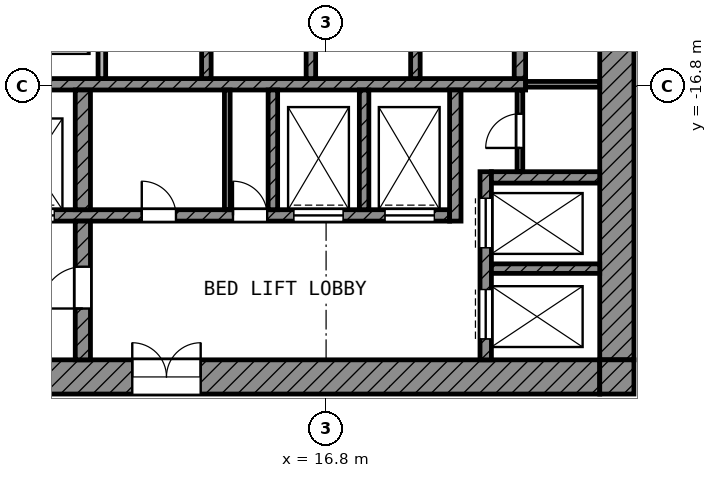
"""IFC4 building model, lengths in metres.
Left out: names, types, materials, properties, quantities, classifications, styles, units other than length and angle.
Written with IfcOpenShell. Run it as: python <this file> out.ifc"""

import sys

from ifc_helpers import new_model, si_unit, direction, frame, frame_2d, origin, place, context, subcontext, project, spatial, rectangle, extrude, element, fill, save


model = new_model("IFC4")
c1 = context("Model", 3, precision=1e-05, world=origin(), true_north=direction((0.0, 1.0)))
c2 = subcontext(c1, "Body", "Model", "MODEL_VIEW")
j1 = project(units=[si_unit("LENGTHUNIT", "METRE"), si_unit("PLANEANGLEUNIT", "RADIAN")], contexts=[c1])
p1 = place(None, origin())
s1 = spatial("IfcSite", under=j1, at=p1, CompositionType="ELEMENT")
p2 = place(p1, origin())
s2 = spatial("IfcBuilding", under=s1, at=p2, CompositionType="ELEMENT")
p3 = place(p2, frame((0.0, 0.0, 158.4)))
s3 = spatial("IfcBuildingStorey", under=s2, at=p3, CompositionType="ELEMENT", Elevation=158.4)
p4 = place(p3, frame((24.45, -24.0, 0.0), z_axis=(0.0, 0.0, 1.0), x_axis=(0.0, 1.0, 0.0)))
e1 = element("IfcWall", 1, at=p4, inside=s3, PredefinedType="SHEAR", context=c2, shape_type="SweptSolid", body=[
    extrude(rectangle(XDim=18.6, YDim=0.9, at=frame_2d((9.3, 0.0))), origin(), (0.0, 0.0, 1.0), 3.6),
])
p5 = place(p4, frame((10.5, 0.0, 0.0)))
e2 = element("IfcOpeningElement", 2, at=p5, cuts=e1, PredefinedType="OPENING", context=c2, shape_type="SweptSolid", body=[
    extrude(rectangle(XDim=1.8, YDim=2.1, at=frame_2d((0.9, 1.05))), frame((0.0, 0.46, 0.0), z_axis=(0.0, -1.0, 0.0), x_axis=(1.0, 0.0, 0.0)), (0.0, 0.0, 1.0), 0.92),
])
p6 = place(p3, frame((5.4, -24.45, 0.0), z_axis=(0.0, 0.0, 1.0), x_axis=(1.0, 0.0, 0.0)))
e3 = element("IfcWall", 3, at=p6, inside=s3, PredefinedType="SHEAR", context=c2, shape_type="SweptSolid", body=[
    extrude(rectangle(XDim=18.6, YDim=0.9, at=frame_2d((9.3, 0.0))), origin(), (0.0, 0.0, 1.0), 3.6),
])
p7 = place(p6, frame((6.3, 0.0, 0.0)))
e4 = element("IfcOpeningElement", 4, at=p7, cuts=e3, PredefinedType="OPENING", context=c2, shape_type="SweptSolid", body=[
    extrude(rectangle(XDim=1.8, YDim=2.1, at=frame_2d((0.9, 1.05))), frame((0.0, 0.46, 0.0), z_axis=(0.0, -1.0, 0.0), x_axis=(1.0, 0.0, 0.0)), (0.0, 0.0, 1.0), 0.92),
])
p8 = place(p3, frame((24.45, -24.9, 0.0), z_axis=(0.0, 0.0, 1.0), x_axis=(0.0, 1.0, 0.0)))
e5 = element("IfcWall", 5, at=p8, inside=s3, PredefinedType="SHEAR", context=c2, shape_type="SweptSolid", body=[
    extrude(rectangle(XDim=0.9, YDim=0.9, at=frame_2d((0.45, 0.0))), origin(), (0.0, 0.0, 1.0), 3.6),
])
p9 = place(p3, frame((5.4, -16.75, 0.0), z_axis=(0.0, 0.0, 1.0), x_axis=(1.0, 0.0, 0.0)))
e6 = element("IfcWall", 6, at=p9, inside=s3, PredefinedType="SHEAR", context=c2, shape_type="SweptSolid", body=[
    extrude(rectangle(XDim=16.65, YDim=0.3, at=frame_2d((8.325, 0.0))), origin(), (0.0, 0.0, 1.0), 3.6),
])
p10 = place(p3, frame((5.4, -20.2, 0.0), z_axis=(0.0, 0.0, 1.0), x_axis=(1.0, 0.0, 0.0)))
e7 = element("IfcWall", 7, at=p10, inside=s3, PredefinedType="SHEAR", context=c2, shape_type="SweptSolid", body=[
    extrude(rectangle(XDim=14.65, YDim=0.3, at=frame_2d((7.325, 0.0))), origin(), (0.0, 0.0, 1.0), 3.6),
])
p11 = place(p10, frame((10.55, 0.0, 0.0)))
e8 = element("IfcOpeningElement", 8, at=p11, cuts=e7, PredefinedType="OPENING", context=c2, shape_type="SweptSolid", body=[
    extrude(rectangle(XDim=1.3, YDim=2.1, at=frame_2d((0.65, 1.05))), frame((0.0, 0.16, 0.0), z_axis=(0.0, -1.0, 0.0), x_axis=(1.0, 0.0, 0.0)), (0.0, 0.0, 1.0), 0.32),
])
p12 = place(p10, frame((12.95, 0.0, 0.0)))
e9 = element("IfcOpeningElement", 9, at=p12, cuts=e7, PredefinedType="OPENING", context=c2, shape_type="SweptSolid", body=[
    extrude(rectangle(XDim=1.3, YDim=2.1, at=frame_2d((0.65, 1.05))), frame((0.0, 0.16, 0.0), z_axis=(0.0, -1.0, 0.0), x_axis=(1.0, 0.0, 0.0)), (0.0, 0.0, 1.0), 0.32),
])
p13 = place(p10, frame((0.55, 0.0, 0.0)))
e10 = element("IfcOpeningElement", 10, at=p13, cuts=e7, PredefinedType="OPENING", context=c2, shape_type="SweptSolid", body=[
    extrude(rectangle(XDim=1.3, YDim=2.1, at=frame_2d((0.65, 1.05))), frame((0.0, 0.16, 0.0), z_axis=(0.0, -1.0, 0.0), x_axis=(1.0, 0.0, 0.0)), (0.0, 0.0, 1.0), 0.32),
])
p14 = place(p10, frame((2.95, 0.0, 0.0)))
e11 = element("IfcOpeningElement", 11, at=p14, cuts=e7, PredefinedType="OPENING", context=c2, shape_type="SweptSolid", body=[
    extrude(rectangle(XDim=1.3, YDim=2.1, at=frame_2d((0.65, 1.05))), frame((0.0, 0.16, 0.0), z_axis=(0.0, -1.0, 0.0), x_axis=(1.0, 0.0, 0.0)), (0.0, 0.0, 1.0), 0.32),
])
p15 = place(p10, frame((6.55, 0.0, 0.0)))
e12 = element("IfcOpeningElement", 12, at=p15, cuts=e7, PredefinedType="OPENING", context=c2, shape_type="SweptSolid", body=[
    extrude(rectangle(XDim=0.9, YDim=2.1, at=frame_2d((0.45, 1.05))), frame((0.0, 0.16, 0.0), z_axis=(0.0, -1.0, 0.0), x_axis=(1.0, 0.0, 0.0)), (0.0, 0.0, 1.0), 0.32),
])
p16 = place(p10, frame((8.95, 0.0, 0.0)))
e13 = element("IfcOpeningElement", 13, at=p16, cuts=e7, PredefinedType="OPENING", context=c2, shape_type="SweptSolid", body=[
    extrude(rectangle(XDim=0.9, YDim=2.1, at=frame_2d((0.45, 1.05))), frame((0.0, 0.16, 0.0), z_axis=(0.0, -1.0, 0.0), x_axis=(1.0, 0.0, 0.0)), (0.0, 0.0, 1.0), 0.32),
])
p17 = place(p3, frame((10.4, -24.0, 0.0), z_axis=(0.0, 0.0, 1.0), x_axis=(0.0, 1.0, 0.0)))
e14 = element("IfcWall", 14, at=p17, inside=s3, PredefinedType="SHEAR", context=c2, shape_type="SweptSolid", body=[
    extrude(rectangle(XDim=3.65, YDim=0.4, at=frame_2d((1.825, 0.0))), origin(), (0.0, 0.0, 1.0), 3.6),
])
p18 = place(p17, frame((1.35, 0.0, 0.0)))
e15 = element("IfcOpeningElement", 15, at=p18, cuts=e14, PredefinedType="OPENING", context=c2, shape_type="SweptSolid", body=[
    extrude(rectangle(XDim=1.1, YDim=2.1, at=frame_2d((0.55, 1.05))), frame((0.0, 0.21, 0.0), z_axis=(0.0, -1.0, 0.0), x_axis=(1.0, 0.0, 0.0)), (0.0, 0.0, 1.0), 0.42),
])
p19 = place(p3, frame((10.4, -20.05, 0.0), z_axis=(0.0, 0.0, 1.0), x_axis=(0.0, 1.0, 0.0)))
e16 = element("IfcWall", 16, at=p19, inside=s3, PredefinedType="SHEAR", context=c2, shape_type="SweptSolid", body=[
    extrude(rectangle(XDim=3.15, YDim=0.4, at=frame_2d((1.575, 0.0))), origin(), (0.0, 0.0, 1.0), 3.6),
])
p20 = place(p3, frame((20.2, -20.35, 0.0), z_axis=(0.0, 0.0, 1.0), x_axis=(0.0, 1.0, 0.0)))
e17 = element("IfcWall", 17, at=p20, inside=s3, PredefinedType="SHEAR", context=c2, shape_type="SweptSolid", body=[
    extrude(rectangle(XDim=3.45, YDim=0.3, at=frame_2d((1.725, 0.0))), origin(), (0.0, 0.0, 1.0), 3.6),
])
p21 = place(p3, frame((21.9, -16.6, 0.0), z_axis=(0.0, 0.0, 1.0), x_axis=(0.0, 1.0, 0.0)))
e18 = element("IfcWall", 18, at=p21, inside=s3, PredefinedType="SHEAR", context=c2, shape_type="SweptSolid", body=[
    extrude(rectangle(XDim=2.35, YDim=0.3, at=frame_2d((1.175, 0.0))), origin(), (0.0, 0.0, 1.0), 3.6),
])
p22 = place(p3, frame((21.15, -19.2, 0.0), z_axis=(0.0, 0.0, 1.0), x_axis=(1.0, 0.0, 0.0)))
e19 = element("IfcWall", 19, at=p22, inside=s3, PredefinedType="SHEAR", context=c2, shape_type="SweptSolid", body=[
    extrude(rectangle(XDim=2.85, YDim=0.3, at=frame_2d((1.425, 0.0))), origin(), (0.0, 0.0, 1.0), 3.6),
])
p23 = place(p3, frame((21.0, -24.0, 0.0), z_axis=(0.0, 0.0, 1.0), x_axis=(0.0, 1.0, 0.0)))
e20 = element("IfcWall", 20, at=p23, inside=s3, PredefinedType="SHEAR", context=c2, shape_type="SweptSolid", body=[
    extrude(rectangle(XDim=4.95, YDim=0.3, at=frame_2d((2.475, 0.0))), origin(), (0.0, 0.0, 1.0), 3.6),
])
p24 = place(p23, frame((2.95, 0.0, 0.0)))
e21 = element("IfcOpeningElement", 21, at=p24, cuts=e20, PredefinedType="OPENING", context=c2, shape_type="SweptSolid", body=[
    extrude(rectangle(XDim=1.3, YDim=2.1, at=frame_2d((0.65, 1.05))), frame((0.0, 0.16, 0.0), z_axis=(0.0, -1.0, 0.0), x_axis=(1.0, 0.0, 0.0)), (0.0, 0.0, 1.0), 0.32),
])
p25 = place(p23, frame((0.55, 0.0, 0.0)))
e22 = element("IfcOpeningElement", 22, at=p25, cuts=e20, PredefinedType="OPENING", context=c2, shape_type="SweptSolid", body=[
    extrude(rectangle(XDim=1.3, YDim=2.1, at=frame_2d((0.65, 1.05))), frame((0.0, 0.16, 0.0), z_axis=(0.0, -1.0, 0.0), x_axis=(1.0, 0.0, 0.0)), (0.0, 0.0, 1.0), 0.32),
])
p26 = place(p3, frame((21.15, -21.6, 0.0), z_axis=(0.0, 0.0, 1.0), x_axis=(1.0, 0.0, 0.0)))
e23 = element("IfcWall", 23, at=p26, inside=s3, PredefinedType="SHEAR", context=c2, shape_type="SweptSolid", body=[
    extrude(rectangle(XDim=2.85, YDim=0.25, at=frame_2d((1.425, 0.0))), origin(), (0.0, 0.0, 1.0), 3.6),
])
for number, where, z_axis, x_axis in (
    (24, (15.4, -20.05, 0.0), (0.0, 0.0, 1.0), (0.0, 1.0, 0.0)),
    (25, (17.8, -20.05, 0.0), (0.0, 0.0, 1.0), (0.0, 1.0, 0.0)),
):
    element("IfcWall", number, at=place(p3, frame(where, z_axis=z_axis, x_axis=x_axis)), inside=s3, PredefinedType="SHEAR", context=c2, shape_type="SweptSolid", body=[
        extrude(rectangle(XDim=3.15, YDim=0.25, at=frame_2d((1.575, 0.0))), origin(), (0.0, 0.0, 1.0), 3.6),
    ])
p27 = place(p3, frame((10.9, -16.6, 0.0), z_axis=(0.0, 0.0, 1.0), x_axis=(0.0, 1.0, 0.0)))
e26 = element("IfcWall", 26, at=p27, inside=s3, PredefinedType="PARTITIONING", context=c2, shape_type="SweptSolid", body=[
    extrude(rectangle(XDim=2.35, YDim=0.2, at=frame_2d((1.175, 0.0))), origin(), (0.0, 0.0, 1.0), 3.6),
])
for number, where, z_axis, x_axis in (
    (27, (13.65, -16.6, 0.0), (0.0, 0.0, 1.0), (0.0, 1.0, 0.0)),
    (28, (16.4, -16.6, 0.0), (0.0, 0.0, 1.0), (0.0, 1.0, 0.0)),
    (29, (19.15, -16.6, 0.0), (0.0, 0.0, 1.0), (0.0, 1.0, 0.0)),
):
    element("IfcWall", number, at=place(p3, frame(where, z_axis=z_axis, x_axis=x_axis)), inside=s3, PredefinedType="SHEAR", context=c2, shape_type="SweptSolid", body=[
        extrude(rectangle(XDim=2.35, YDim=0.25, at=frame_2d((1.175, 0.0))), origin(), (0.0, 0.0, 1.0), 3.6),
    ])
p28 = place(p3, frame((21.9, -19.05, 0.0), z_axis=(0.0, 0.0, 1.0), x_axis=(0.0, 1.0, 0.0)))
e30 = element("IfcWall", 30, at=p28, inside=s3, PredefinedType="PARTITIONING", context=c2, shape_type="SweptSolid", body=[
    extrude(rectangle(XDim=2.15, YDim=0.15, at=frame_2d((1.075, 0.0))), origin(), (0.0, 0.0, 1.0), 3.6),
])
p29 = place(p28, frame((0.625, 0.0, 0.0)))
e31 = element("IfcOpeningElement", 31, at=p29, cuts=e30, PredefinedType="OPENING", context=c2, shape_type="SweptSolid", body=[
    extrude(rectangle(XDim=0.9, YDim=2.1, at=frame_2d((0.45, 1.05))), frame((0.0, 0.085, 0.0), z_axis=(0.0, -1.0, 0.0), x_axis=(1.0, 0.0, 0.0)), (0.0, 0.0, 1.0), 0.17),
])
p30 = place(p3, frame((22.05, -16.75, 0.0), z_axis=(0.0, 0.0, 1.0), x_axis=(1.0, 0.0, 0.0)))
e32 = element("IfcWall", 32, at=p30, inside=s3, PredefinedType="PARTITIONING", context=c2, shape_type="SweptSolid", body=[
    extrude(rectangle(XDim=1.95, YDim=0.15, at=frame_2d((0.975, 0.0))), origin(), (0.0, 0.0, 1.0), 3.6),
])
p31 = place(p3, frame((14.2, -20.05, 0.0), z_axis=(0.0, 0.0, 1.0), x_axis=(0.0, 1.0, 0.0)))
e33 = element("IfcWall", 33, at=p31, inside=s3, PredefinedType="PARTITIONING", context=c2, shape_type="SweptSolid", body=[
    extrude(rectangle(XDim=3.15, YDim=0.15, at=frame_2d((1.575, 0.0))), origin(), (0.0, 0.0, 1.0), 3.6),
])
p32 = place(p24, origin())
e34 = element("IfcDoor", 34, at=p32, inside=s3, OperationType="DOUBLE_DOOR_SLIDING", PredefinedType="DOOR", context=c2, shape_type="SweptSolid", body=[
    extrude(rectangle(XDim=1.3, YDim=2.1, at=frame_2d((0.65, 1.05))), frame((0.0, 0.025, 0.0), z_axis=(0.0, -1.0, 0.0), x_axis=(1.0, 0.0, 0.0)), (0.0, 0.0, 1.0), 0.05),
])
fill(e21, e34)
p33 = place(p25, origin())
e35 = element("IfcDoor", 35, at=p33, inside=s3, OperationType="DOUBLE_DOOR_SLIDING", PredefinedType="DOOR", context=c2, shape_type="SweptSolid", body=[
    extrude(rectangle(XDim=1.3, YDim=2.1, at=frame_2d((0.65, 1.05))), frame((0.0, 0.025, 0.0), z_axis=(0.0, -1.0, 0.0), x_axis=(1.0, 0.0, 0.0)), (0.0, 0.0, 1.0), 0.05),
])
fill(e22, e35)
p34 = place(p11, origin())
e36 = element("IfcDoor", 36, at=p34, inside=s3, OperationType="DOUBLE_DOOR_SLIDING", PredefinedType="DOOR", context=c2, shape_type="SweptSolid", body=[
    extrude(rectangle(XDim=1.3, YDim=2.1, at=frame_2d((0.65, 1.05))), frame((0.0, 0.025, 0.0), z_axis=(0.0, -1.0, 0.0), x_axis=(1.0, 0.0, 0.0)), (0.0, 0.0, 1.0), 0.05),
])
fill(e8, e36)
p35 = place(p12, origin())
e37 = element("IfcDoor", 37, at=p35, inside=s3, OperationType="DOUBLE_DOOR_SLIDING", PredefinedType="DOOR", context=c2, shape_type="SweptSolid", body=[
    extrude(rectangle(XDim=1.3, YDim=2.1, at=frame_2d((0.65, 1.05))), frame((0.0, 0.025, 0.0), z_axis=(0.0, -1.0, 0.0), x_axis=(1.0, 0.0, 0.0)), (0.0, 0.0, 1.0), 0.05),
])
fill(e9, e37)
p36 = place(p14, origin())
e38 = element("IfcDoor", 38, at=p36, inside=s3, OperationType="DOUBLE_DOOR_SLIDING", PredefinedType="DOOR", context=c2, shape_type="SweptSolid", body=[
    extrude(rectangle(XDim=1.3, YDim=2.1, at=frame_2d((0.65, 1.05))), frame((0.0, 0.025, 0.0), z_axis=(0.0, -1.0, 0.0), x_axis=(1.0, 0.0, 0.0)), (0.0, 0.0, 1.0), 0.05),
])
fill(e11, e38)
p37 = place(p18, origin())
e39 = element("IfcDoor", 39, at=p37, inside=s3, OperationType="SINGLE_SWING_LEFT", PredefinedType="DOOR", context=c2, shape_type="SweptSolid", body=[
    extrude(rectangle(XDim=1.1, YDim=2.1, at=frame_2d((0.55, 1.05))), frame((0.0, 0.025, 0.0), z_axis=(0.0, -1.0, 0.0), x_axis=(1.0, 0.0, 0.0)), (0.0, 0.0, 1.0), 0.05),
])
fill(e15, e39)
p38 = place(p7, origin())
e40 = element("IfcDoor", 40, at=p38, inside=s3, OperationType="DOUBLE_DOOR_SINGLE_SWING", PredefinedType="DOOR", context=c2, shape_type="SweptSolid", body=[
    extrude(rectangle(XDim=1.8, YDim=2.1, at=frame_2d((0.9, 1.05))), frame((0.0, 0.025, 0.0), z_axis=(0.0, -1.0, 0.0), x_axis=(1.0, 0.0, 0.0)), (0.0, 0.0, 1.0), 0.05),
])
fill(e4, e40)
p39 = place(p29, origin())
e41 = element("IfcDoor", 41, at=p39, inside=s3, OperationType="SINGLE_SWING_LEFT", PredefinedType="DOOR", context=c2, shape_type="SweptSolid", body=[
    extrude(rectangle(XDim=0.9, YDim=2.1, at=frame_2d((0.45, 1.05))), frame((0.0, 0.025, 0.0), z_axis=(0.0, -1.0, 0.0), x_axis=(1.0, 0.0, 0.0)), (0.0, 0.0, 1.0), 0.05),
])
fill(e31, e41)
p40 = place(p15, origin())
e42 = element("IfcDoor", 42, at=p40, inside=s3, OperationType="SINGLE_SWING_LEFT", PredefinedType="DOOR", context=c2, shape_type="SweptSolid", body=[
    extrude(rectangle(XDim=0.9, YDim=2.1, at=frame_2d((0.45, 1.05))), frame((0.0, 0.025, 0.0), z_axis=(0.0, -1.0, 0.0), x_axis=(1.0, 0.0, 0.0)), (0.0, 0.0, 1.0), 0.05),
])
fill(e12, e42)
p41 = place(p16, origin())
e43 = element("IfcDoor", 43, at=p41, inside=s3, OperationType="SINGLE_SWING_LEFT", PredefinedType="DOOR", context=c2, shape_type="SweptSolid", body=[
    extrude(rectangle(XDim=0.9, YDim=2.1, at=frame_2d((0.45, 1.05))), frame((0.0, 0.025, 0.0), z_axis=(0.0, -1.0, 0.0), x_axis=(1.0, 0.0, 0.0)), (0.0, 0.0, 1.0), 0.05),
])
fill(e13, e43)
save(model, sys.argv[1])
